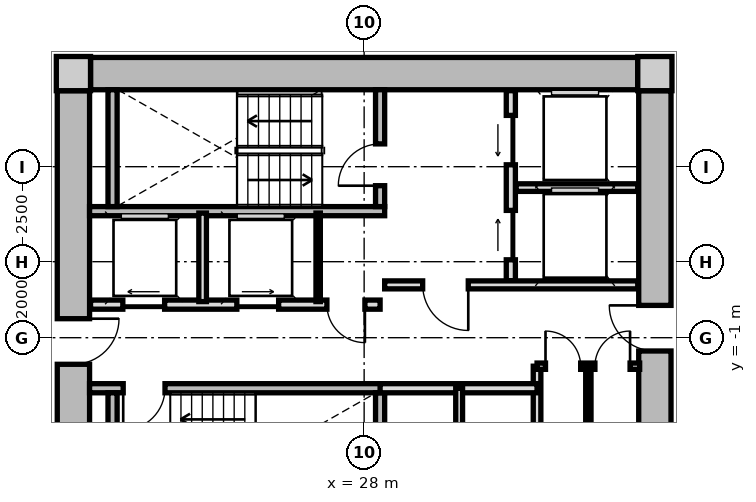
"""IFC4 building model, lengths in metres.
Left out: names, types, materials, properties, quantities, classifications, styles, units other than length and angle.
Written with IfcOpenShell. Run it as: python <this file> out.ifc"""

import sys

from ifc_helpers import new_model, si_unit, direction, frame, frame_2d, origin, origin_2d, place, context, subcontext, project, spatial, rectangle, extrude, source, transform, mapped, element, fill, save


model = new_model("IFC4")
c1 = context("Model", 3, precision=1e-05, world=origin(), true_north=direction((0.0, 1.0)))
c2 = subcontext(c1, "Body", "Model", "MODEL_VIEW")
j1 = project(units=[si_unit("LENGTHUNIT", "METRE"), si_unit("PLANEANGLEUNIT", "RADIAN")], contexts=[c1])
p1 = place(None, origin())
s1 = spatial("IfcSite", under=j1, at=p1, CompositionType="ELEMENT")
p2 = place(p1, origin())
s2 = spatial("IfcBuilding", under=s1, at=p2, CompositionType="ELEMENT")
p3 = place(p2, frame((0.0, 0.0, 70.4)))
s3 = spatial("IfcBuildingStorey", under=s2, at=p3, CompositionType="ELEMENT", Elevation=70.4)
m1 = source(origin(), c2, "Body", "SweptSolid", [
    extrude(rectangle(XDim=0.9, YDim=0.9, at=origin_2d()), origin(), (0.0, 0.0, 1.0), 3.05),
])
for number, where, z_axis, x_axis in (
    (1, (35.65, 5.95, 0.0), (0.0, 0.0, 1.0), (1.0, 0.0, 0.0)),
    (2, (20.35, 5.95, 0.0), (0.0, 0.0, 1.0), (1.0, 0.0, 0.0)),
):
    element("IfcColumn", number, at=place(p3, frame(where, z_axis=z_axis, x_axis=x_axis)), inside=s3, PredefinedType="COLUMN", context=c2, shape_type="MappedRepresentation", body=[
        mapped(m1, transform((0.0, 0.0, 0.0), x_axis=(1.0, 0.0, 0.0), y_axis=(0.0, 1.0, 0.0), z_axis=(0.0, 0.0, 1.0), scale=1.0)),
    ])
m2 = source(origin(), c2, "Body", "SweptSolid", [
    extrude(rectangle(XDim=14.4, YDim=0.85, at=frame_2d((7.2, 0.0))), origin(), (0.0, 0.0, 1.0), 2.73),
])
p4 = place(p3, frame((20.8, 5.95, 0.0), z_axis=(0.0, 0.0, 1.0), x_axis=(1.0, 0.0, 0.0)))
e3 = element("IfcWall", 3, at=p4, inside=s3, PredefinedType="SHEAR", context=c2, shape_type="MappedRepresentation", body=[
    mapped(m2, transform((0.0, 0.0, 0.0), x_axis=(1.0, 0.0, 0.0), y_axis=(0.0, 1.0, 0.0), z_axis=(0.0, 0.0, 1.0), scale=1.0)),
])
m3 = source(origin(), c2, "Body", "SweptSolid", [
    extrude(rectangle(XDim=11.0, YDim=0.85, at=frame_2d((5.5, 0.0))), origin(), (0.0, 0.0, 1.0), 2.73),
])
p5 = place(p3, frame((20.35, -5.5, 0.0), z_axis=(0.0, 0.0, 1.0), x_axis=(0.0, 1.0, 0.0)))
e4 = element("IfcWall", 4, at=p5, inside=s3, PredefinedType="SHEAR", context=c2, shape_type="MappedRepresentation", body=[
    mapped(m3, transform((0.0, 0.0, 0.0), x_axis=(1.0, 0.0, 0.0), y_axis=(0.0, 1.0, 0.0), z_axis=(0.0, 0.0, 1.0), scale=1.0)),
])
p6 = place(p5, frame((3.8, 0.0, 0.0)))
e5 = element("IfcOpeningElement", 5, at=p6, cuts=e4, PredefinedType="OPENING", context=c2, shape_type="SweptSolid", body=[
    extrude(rectangle(XDim=1.2, YDim=2.15, at=frame_2d((0.6, 1.075))), frame((0.0, 0.435, 0.0), z_axis=(0.0, -1.0, 0.0), x_axis=(1.0, 0.0, 0.0)), (0.0, 0.0, 1.0), 0.87),
])
p7 = place(p3, frame((35.65, 5.5, 0.0), z_axis=(0.0, 0.0, 1.0), x_axis=(0.0, -1.0, 0.0)))
e6 = element("IfcWall", 6, at=p7, inside=s3, PredefinedType="SHEAR", context=c2, shape_type="MappedRepresentation", body=[
    mapped(m3, transform((0.0, 0.0, 0.0), x_axis=(1.0, 0.0, 0.0), y_axis=(0.0, 1.0, 0.0), z_axis=(0.0, 0.0, 1.0), scale=1.0)),
])
p8 = place(p7, frame((5.65, 0.0, 0.0)))
e7 = element("IfcOpeningElement", 7, at=p8, cuts=e6, PredefinedType="OPENING", context=c2, shape_type="SweptSolid", body=[
    extrude(rectangle(XDim=1.2, YDim=2.15, at=frame_2d((0.6, 1.075))), frame((0.0, 0.435, 0.0), z_axis=(0.0, -1.0, 0.0), x_axis=(1.0, 0.0, 0.0)), (0.0, 0.0, 1.0), 0.87),
])
m4 = source(origin(), c2, "Body", "SweptSolid", [
    extrude(rectangle(XDim=7.765, YDim=0.24, at=frame_2d((3.883, 0.0))), origin(), (0.0, 0.0, 1.0), 2.73),
])
p9 = place(p3, frame((20.775, 2.33, 0.0), z_axis=(0.0, 0.0, 1.0), x_axis=(1.0, 0.0, 0.0)))
e8 = element("IfcWall", 8, at=p9, inside=s3, PredefinedType="PARTITIONING", context=c2, shape_type="MappedRepresentation", body=[
    mapped(m4, transform((0.0, 0.0, 0.0), x_axis=(1.0, 0.0, 0.0), y_axis=(0.0, 1.0, 0.0), z_axis=(0.0, 0.0, 1.0), scale=1.0)),
])
m5 = source(origin(), c2, "Body", "SweptSolid", [
    extrude(rectangle(XDim=3.075, YDim=0.24, at=frame_2d((1.538, 0.0))), origin(), (0.0, 0.0, 1.0), 2.73),
])
p10 = place(p3, frame((21.38, 2.45, 0.0), z_axis=(0.0, 0.0, 1.0), x_axis=(0.0, 1.0, 0.0)))
e9 = element("IfcWall", 9, at=p10, inside=s3, PredefinedType="PARTITIONING", context=c2, shape_type="MappedRepresentation", body=[
    mapped(m5, transform((0.0, 0.0, 0.0), x_axis=(1.0, 0.0, 0.0), y_axis=(0.0, 1.0, 0.0), z_axis=(0.0, 0.0, 1.0), scale=1.0)),
])
p11 = place(p3, frame((28.42, 2.45, 0.0), z_axis=(0.0, 0.0, 1.0), x_axis=(0.0, 1.0, 0.0)))
e10 = element("IfcWall", 10, at=p11, inside=s3, PredefinedType="PARTITIONING", context=c2, shape_type="MappedRepresentation", body=[
    mapped(m5, transform((0.0, 0.0, 0.0), x_axis=(1.0, 0.0, 0.0), y_axis=(0.0, 1.0, 0.0), z_axis=(0.0, 0.0, 1.0), scale=1.0)),
])
p12 = place(p11, frame((0.55, 0.0, 0.0)))
e11 = element("IfcOpeningElement", 11, at=p12, cuts=e10, PredefinedType="OPENING", context=c2, shape_type="SweptSolid", body=[
    extrude(rectangle(XDim=1.1, YDim=2.15, at=frame_2d((0.55, 1.075))), frame((0.0, 0.13, 0.0), z_axis=(0.0, -1.0, 0.0), x_axis=(1.0, 0.0, 0.0)), (0.0, 0.0, 1.0), 0.26),
])
p13 = place(p3, frame((20.775, -2.33, 0.0), z_axis=(0.0, 0.0, 1.0), x_axis=(1.0, 0.0, 0.0)))
e12 = element("IfcWall", 12, at=p13, inside=s3, PredefinedType="PARTITIONING", context=c2, shape_type="MappedRepresentation", body=[
    mapped(m4, transform((0.0, 0.0, 0.0), x_axis=(1.0, 0.0, 0.0), y_axis=(0.0, 1.0, 0.0), z_axis=(0.0, 0.0, 1.0), scale=1.0)),
])
p14 = place(p13, frame((0.885, 0.0, 0.0)))
e13 = element("IfcOpeningElement", 13, at=p14, cuts=e12, PredefinedType="OPENING", context=c2, shape_type="SweptSolid", body=[
    extrude(rectangle(XDim=1.1, YDim=2.15, at=frame_2d((0.55, 1.075))), frame((0.0, 0.13, 0.0), z_axis=(0.0, -1.0, 0.0), x_axis=(1.0, 0.0, 0.0)), (0.0, 0.0, 1.0), 0.26),
])
for number, where, z_axis, x_axis in (
    (14, (21.38, -5.525, 0.0), (0.0, 0.0, 1.0), (0.0, 1.0, 0.0)),
    (15, (28.42, -5.525, 0.0), (0.0, 0.0, 1.0), (0.0, 1.0, 0.0)),
):
    element("IfcWall", number, at=place(p3, frame(where, z_axis=z_axis, x_axis=x_axis)), inside=s3, PredefinedType="PARTITIONING", context=c2, shape_type="MappedRepresentation", body=[
        mapped(m5, transform((0.0, 0.0, 0.0), x_axis=(1.0, 0.0, 0.0), y_axis=(0.0, 1.0, 0.0), z_axis=(0.0, 0.0, 1.0), scale=1.0)),
    ])
m6 = source(origin(), c2, "Body", "SweptSolid", [
    extrude(rectangle(XDim=5.0, YDim=0.24, at=frame_2d((2.5, 0.0))), origin(), (0.0, 0.0, 1.0), 2.715),
])
p15 = place(p3, frame((31.86, 0.5, 0.0), z_axis=(0.0, 0.0, 1.0), x_axis=(0.0, 1.0, 0.0)))
e16 = element("IfcWall", 16, at=p15, inside=s3, PredefinedType="PARTITIONING", context=c2, shape_type="MappedRepresentation", body=[
    mapped(m6, transform((0.0, 0.0, 0.0), x_axis=(1.0, 0.0, 0.0), y_axis=(0.0, 1.0, 0.0), z_axis=(0.0, 0.0, 1.0), scale=1.0)),
])
p16 = place(p15, frame((3.05, 0.0, 0.0)))
e17 = element("IfcOpeningElement", 17, at=p16, cuts=e16, PredefinedType="OPENING", context=c2, shape_type="SweptSolid", body=[
    extrude(rectangle(XDim=1.3, YDim=2.2, at=frame_2d((0.65, 1.1))), frame((0.0, 0.13, 0.0), z_axis=(0.0, -1.0, 0.0), x_axis=(1.0, 0.0, 0.0)), (0.0, 0.0, 1.0), 0.26),
])
p17 = place(p15, frame((0.55, 0.0, 0.0)))
e18 = element("IfcOpeningElement", 18, at=p17, cuts=e16, PredefinedType="OPENING", context=c2, shape_type="SweptSolid", body=[
    extrude(rectangle(XDim=1.3, YDim=2.2, at=frame_2d((0.65, 1.1))), frame((0.0, 0.13, 0.0), z_axis=(0.0, -1.0, 0.0), x_axis=(1.0, 0.0, 0.0)), (0.0, 0.0, 1.0), 0.26),
])
m7 = source(origin(), c2, "Body", "SweptSolid", [
    extrude(rectangle(XDim=3.2, YDim=0.2, at=frame_2d((1.6, 0.0))), origin(), (0.0, 0.0, 1.0), 2.715),
])
p18 = place(p3, frame((32.0, 2.95, 0.0), z_axis=(0.0, 0.0, 1.0), x_axis=(1.0, 0.0, 0.0)))
e19 = element("IfcWall", 19, at=p18, inside=s3, PredefinedType="PARTITIONING", context=c2, shape_type="MappedRepresentation", body=[
    mapped(m7, transform((0.0, 0.0, 0.0), x_axis=(1.0, 0.0, 0.0), y_axis=(0.0, 1.0, 0.0), z_axis=(0.0, 0.0, 1.0), scale=1.0)),
])
m8 = source(origin(), c2, "Body", "SweptSolid", [
    extrude(rectangle(XDim=6.66, YDim=0.21, at=frame_2d((3.33, 0.0))), origin(), (0.0, 0.0, 1.0), 2.715),
])
p19 = place(p3, frame((28.54, 0.39, 0.0), z_axis=(0.0, 0.0, 1.0), x_axis=(1.0, 0.0, 0.0)))
e20 = element("IfcWall", 20, at=p19, inside=s3, PredefinedType="PARTITIONING", context=c2, shape_type="MappedRepresentation", body=[
    mapped(m8, transform((0.0, 0.0, 0.0), x_axis=(1.0, 0.0, 0.0), y_axis=(0.0, 1.0, 0.0), z_axis=(0.0, 0.0, 1.0), scale=1.0)),
])
p20 = place(p19, frame((1.0, 0.0, 0.0)))
e21 = element("IfcOpeningElement", 21, at=p20, cuts=e20, PredefinedType="OPENING", context=c2, shape_type="SweptSolid", body=[
    extrude(rectangle(XDim=1.2, YDim=2.15, at=frame_2d((0.6, 1.075))), frame((0.0, 0.115, 0.0), z_axis=(0.0, -1.0, 0.0), x_axis=(1.0, 0.0, 0.0)), (0.0, 0.0, 1.0), 0.23),
])
m9 = source(origin(), c2, "Body", "SweptSolid", [
    extrude(rectangle(XDim=7.62, YDim=0.24, at=frame_2d((3.81, 0.0))), origin(), (0.0, 0.0, 1.0), 2.715),
])
p21 = place(p3, frame((20.8, -0.13, 0.0), z_axis=(0.0, 0.0, 1.0), x_axis=(1.0, 0.0, 0.0)))
e22 = element("IfcWall", 22, at=p21, inside=s3, PredefinedType="PARTITIONING", context=c2, shape_type="MappedRepresentation", body=[
    mapped(m9, transform((0.0, 0.0, 0.0), x_axis=(1.0, 0.0, 0.0), y_axis=(0.0, 1.0, 0.0), z_axis=(0.0, 0.0, 1.0), scale=1.0)),
])
p22 = place(p21, frame((6.22, 0.0, 0.0)))
e23 = element("IfcOpeningElement", 23, at=p22, cuts=e22, PredefinedType="OPENING", context=c2, shape_type="SweptSolid", body=[
    extrude(rectangle(XDim=1.0, YDim=2.1, at=frame_2d((0.5, 1.05))), frame((0.0, 0.13, 0.0), z_axis=(0.0, -1.0, 0.0), x_axis=(1.0, 0.0, 0.0)), (0.0, 0.0, 1.0), 0.26),
])
p23 = place(p21, frame((0.85, 0.0, 0.0)))
e24 = element("IfcOpeningElement", 24, at=p23, cuts=e22, PredefinedType="OPENING", context=c2, shape_type="SweptSolid", body=[
    extrude(rectangle(XDim=1.1, YDim=2.2, at=frame_2d((0.55, 1.1))), frame((0.0, 0.13, 0.0), z_axis=(0.0, -1.0, 0.0), x_axis=(1.0, 0.0, 0.0)), (0.0, 0.0, 1.0), 0.26),
])
p24 = place(p21, frame((3.85, 0.0, 0.0)))
e25 = element("IfcOpeningElement", 25, at=p24, cuts=e22, PredefinedType="OPENING", context=c2, shape_type="SweptSolid", body=[
    extrude(rectangle(XDim=1.1, YDim=2.2, at=frame_2d((0.55, 1.1))), frame((0.0, 0.13, 0.0), z_axis=(0.0, -1.0, 0.0), x_axis=(1.0, 0.0, 0.0)), (0.0, 0.0, 1.0), 0.26),
])
m10 = source(origin(), c2, "Body", "SweptSolid", [
    extrude(rectangle(XDim=2.33, YDim=0.115, at=frame_2d((1.165, 0.0))), origin(), (0.0, 0.0, 1.0), 2.715),
])
p25 = place(p3, frame((26.79, -0.05, 0.0), z_axis=(0.0, 0.0, 1.0), x_axis=(0.0, 1.0, 0.0)))
e26 = element("IfcWall", 26, at=p25, inside=s3, PredefinedType="PARTITIONING", context=c2, shape_type="MappedRepresentation", body=[
    mapped(m10, transform((0.0, 0.0, 0.0), x_axis=(1.0, 0.0, 0.0), y_axis=(0.0, 1.0, 0.0), z_axis=(0.0, 0.0, 1.0), scale=1.0)),
])
m11 = source(origin(), c2, "Body", "SweptSolid", [
    extrude(rectangle(XDim=2.33, YDim=0.2, at=frame_2d((1.165, 0.0))), origin(), (0.0, 0.0, 1.0), 2.715),
])
p26 = place(p3, frame((23.75, -0.05, 0.0), z_axis=(0.0, 0.0, 1.0), x_axis=(0.0, 1.0, 0.0)))
e27 = element("IfcWall", 27, at=p26, inside=s3, PredefinedType="PARTITIONING", context=c2, shape_type="MappedRepresentation", body=[
    mapped(m11, transform((0.0, 0.0, 0.0), x_axis=(1.0, 0.0, 0.0), y_axis=(0.0, 1.0, 0.0), z_axis=(0.0, 0.0, 1.0), scale=1.0)),
])
m12 = source(origin(), c2, "Body", "SweptSolid", [
    extrude(rectangle(XDim=3.8, YDim=0.2, at=frame_2d((1.9, 0.0))), origin(), (0.0, 0.0, 1.0), 2.715),
])
p27 = place(p3, frame((32.55, -5.55, 0.0), z_axis=(0.0, 0.0, 1.0), x_axis=(0.0, 1.0, 0.0)))
e28 = element("IfcWall", 28, at=p27, inside=s3, PredefinedType="PARTITIONING", context=c2, shape_type="MappedRepresentation", body=[
    mapped(m12, transform((0.0, 0.0, 0.0), x_axis=(1.0, 0.0, 0.0), y_axis=(0.0, 1.0, 0.0), z_axis=(0.0, 0.0, 1.0), scale=1.0)),
])
m13 = source(origin(), c2, "Body", "SweptSolid", [
    extrude(rectangle(XDim=4.13, YDim=0.24, at=frame_2d((2.065, 0.0))), origin(), (0.0, 0.0, 1.0), 2.715),
])
p28 = place(p3, frame((28.42, -2.33, 0.0), z_axis=(0.0, 0.0, 1.0), x_axis=(1.0, 0.0, 0.0)))
e29 = element("IfcWall", 29, at=p28, inside=s3, PredefinedType="PARTITIONING", context=c2, shape_type="MappedRepresentation", body=[
    mapped(m13, transform((0.0, 0.0, 0.0), x_axis=(1.0, 0.0, 0.0), y_axis=(0.0, 1.0, 0.0), z_axis=(0.0, 0.0, 1.0), scale=1.0)),
])
m14 = source(origin(), c2, "Body", "SweptSolid", [
    extrude(rectangle(XDim=3.22, YDim=0.18, at=frame_2d((1.61, 0.0))), origin(), (0.0, 0.0, 1.0), 2.715),
])
p29 = place(p3, frame((30.5, -5.55, 0.0), z_axis=(0.0, 0.0, 1.0), x_axis=(0.0, 1.0, 0.0)))
e30 = element("IfcWall", 30, at=p29, inside=s3, PredefinedType="PARTITIONING", context=c2, shape_type="MappedRepresentation", body=[
    mapped(m14, transform((0.0, 0.0, 0.0), x_axis=(1.0, 0.0, 0.0), y_axis=(0.0, 1.0, 0.0), z_axis=(0.0, 0.0, 1.0), scale=1.0)),
])
m15 = source(origin(), c2, "Body", "SweptSolid", [
    extrude(rectangle(XDim=2.7, YDim=0.165, at=frame_2d((1.35, 0.0))), origin(), (0.0, 0.0, 1.0), 2.715),
])
p30 = place(p3, frame((32.55, -1.75, 0.0), z_axis=(0.0, 0.0, 1.0), x_axis=(1.0, 0.0, 0.0)))
e31 = element("IfcWall", 31, at=p30, inside=s3, PredefinedType="PARTITIONING", context=c2, shape_type="MappedRepresentation", body=[
    mapped(m15, transform((0.0, 0.0, 0.0), x_axis=(1.0, 0.0, 0.0), y_axis=(0.0, 1.0, 0.0), z_axis=(0.0, 0.0, 1.0), scale=1.0)),
])
p31 = place(p30, frame((0.222, 0.0, 0.0)))
e32 = element("IfcOpeningElement", 32, at=p31, cuts=e31, PredefinedType="OPENING", context=c2, shape_type="SweptSolid", body=[
    extrude(rectangle(XDim=0.925, YDim=2.1, at=frame_2d((0.462, 1.05))), frame((0.0, 0.093, 0.0), z_axis=(0.0, -1.0, 0.0), x_axis=(1.0, 0.0, 0.0)), (0.0, 0.0, 1.0), 0.185),
])
p32 = place(p30, frame((1.522, 0.0, 0.0)))
e33 = element("IfcOpeningElement", 33, at=p32, cuts=e31, PredefinedType="OPENING", context=c2, shape_type="SweptSolid", body=[
    extrude(rectangle(XDim=0.925, YDim=2.1, at=frame_2d((0.462, 1.05))), frame((0.0, 0.093, 0.0), z_axis=(0.0, -1.0, 0.0), x_axis=(1.0, 0.0, 0.0)), (0.0, 0.0, 1.0), 0.185),
])
m16 = source(origin(), c2, "Body", "SweptSolid", [
    extrude(rectangle(XDim=3.8, YDim=0.14, at=frame_2d((1.9, 0.0))), origin(), (0.0, 0.0, 1.0), 2.715),
])
p33 = place(p3, frame((33.9, -5.55, 0.0), z_axis=(0.0, 0.0, 1.0), x_axis=(0.0, 1.0, 0.0)))
e34 = element("IfcWall", 34, at=p33, inside=s3, PredefinedType="PARTITIONING", context=c2, shape_type="MappedRepresentation", body=[
    mapped(m16, transform((0.0, 0.0, 0.0), x_axis=(1.0, 0.0, 0.0), y_axis=(0.0, 1.0, 0.0), z_axis=(0.0, 0.0, 1.0), scale=1.0)),
])
m17 = source(origin(), c2, "Body", "SweptSolid", [
    extrude(rectangle(XDim=1.1, YDim=2.15, at=frame_2d((0.55, 1.075))), frame((0.0, 0.025, 0.0), z_axis=(0.0, -1.0, 0.0), x_axis=(1.0, 0.0, 0.0)), (0.0, 0.0, 1.0), 0.05),
])
p34 = place(p12, origin())
e35 = element("IfcDoor", 35, at=p34, inside=s3, OperationType="SINGLE_SWING_LEFT", PredefinedType="DOOR", context=c2, shape_type="MappedRepresentation", body=[
    mapped(m17, transform((0.0, 0.0, 0.0), x_axis=(1.0, 0.0, 0.0), y_axis=(0.0, 1.0, 0.0), z_axis=(0.0, 0.0, 1.0), scale=1.0)),
])
fill(e11, e35)
p35 = place(p14, frame((1.1, 0.0, 0.0), z_axis=(0.0, 0.0, 1.0), x_axis=(-1.0, 0.0, 0.0)))
e36 = element("IfcDoor", 36, at=p35, inside=s3, OperationType="SINGLE_SWING_RIGHT", PredefinedType="DOOR", context=c2, shape_type="MappedRepresentation", body=[
    mapped(m17, transform((0.0, 0.0, 0.0), x_axis=(1.0, 0.0, 0.0), y_axis=(0.0, 1.0, 0.0), z_axis=(0.0, 0.0, 1.0), scale=1.0)),
])
fill(e13, e36)
m18 = source(origin(), c2, "Body", "SweptSolid", [
    extrude(rectangle(XDim=1.3, YDim=2.2, at=frame_2d((0.65, 1.1))), frame((0.0, 0.025, 0.0), z_axis=(0.0, -1.0, 0.0), x_axis=(1.0, 0.0, 0.0)), (0.0, 0.0, 1.0), 0.05),
])
p36 = place(p16, origin())
e37 = element("IfcDoor", 37, at=p36, inside=s3, OperationType="SLIDING_TO_LEFT", PredefinedType="DOOR", context=c2, shape_type="MappedRepresentation", body=[
    mapped(m18, transform((0.0, 0.0, 0.0), x_axis=(1.0, 0.0, 0.0), y_axis=(0.0, 1.0, 0.0), z_axis=(0.0, 0.0, 1.0), scale=1.0)),
])
fill(e17, e37)
p37 = place(p17, origin())
e38 = element("IfcDoor", 38, at=p37, inside=s3, OperationType="SLIDING_TO_RIGHT", PredefinedType="DOOR", context=c2, shape_type="MappedRepresentation", body=[
    mapped(m18, transform((0.0, 0.0, 0.0), x_axis=(1.0, 0.0, 0.0), y_axis=(0.0, 1.0, 0.0), z_axis=(0.0, 0.0, 1.0), scale=1.0)),
])
fill(e18, e38)
m19 = source(origin(), c2, "Body", "SweptSolid", [
    extrude(rectangle(XDim=1.2, YDim=2.15, at=frame_2d((0.6, 1.075))), frame((0.0, 0.025, 0.0), z_axis=(0.0, -1.0, 0.0), x_axis=(1.0, 0.0, 0.0)), (0.0, 0.0, 1.0), 0.05),
])
p38 = place(p20, frame((1.2, 0.0, 0.0), z_axis=(0.0, 0.0, 1.0), x_axis=(-1.0, 0.0, 0.0)))
e39 = element("IfcDoor", 39, at=p38, inside=s3, OperationType="SINGLE_SWING_LEFT", PredefinedType="DOOR", context=c2, shape_type="MappedRepresentation", body=[
    mapped(m19, transform((0.0, 0.0, 0.0), x_axis=(1.0, 0.0, 0.0), y_axis=(0.0, 1.0, 0.0), z_axis=(0.0, 0.0, 1.0), scale=1.0)),
])
fill(e21, e39)
p39 = place(p6, frame((1.2, 0.0, 0.0), z_axis=(0.0, 0.0, 1.0), x_axis=(-1.0, 0.0, 0.0)))
e40 = element("IfcDoor", 40, at=p39, inside=s3, OperationType="SINGLE_SWING_LEFT", PredefinedType="DOOR", context=c2, shape_type="MappedRepresentation", body=[
    mapped(m19, transform((0.0, 0.0, 0.0), x_axis=(1.0, 0.0, 0.0), y_axis=(0.0, 1.0, 0.0), z_axis=(0.0, 0.0, 1.0), scale=1.0)),
])
fill(e5, e40)
p40 = place(p8, frame((1.2, 0.0, 0.0), z_axis=(0.0, 0.0, 1.0), x_axis=(-1.0, 0.0, 0.0)))
e41 = element("IfcDoor", 41, at=p40, inside=s3, OperationType="SINGLE_SWING_RIGHT", PredefinedType="DOOR", context=c2, shape_type="MappedRepresentation", body=[
    mapped(m19, transform((0.0, 0.0, 0.0), x_axis=(1.0, 0.0, 0.0), y_axis=(0.0, 1.0, 0.0), z_axis=(0.0, 0.0, 1.0), scale=1.0)),
])
fill(e7, e41)
m20 = source(origin(), c2, "Body", "SweptSolid", [
    extrude(rectangle(XDim=1.0, YDim=2.1, at=frame_2d((0.5, 1.05))), frame((0.0, 0.025, 0.0), z_axis=(0.0, -1.0, 0.0), x_axis=(1.0, 0.0, 0.0)), (0.0, 0.0, 1.0), 0.05),
])
p41 = place(p22, frame((1.0, 0.0, 0.0), z_axis=(0.0, 0.0, 1.0), x_axis=(-1.0, 0.0, 0.0)))
e42 = element("IfcDoor", 42, at=p41, inside=s3, OperationType="SINGLE_SWING_LEFT", PredefinedType="DOOR", context=c2, shape_type="MappedRepresentation", body=[
    mapped(m20, transform((0.0, 0.0, 0.0), x_axis=(1.0, 0.0, 0.0), y_axis=(0.0, 1.0, 0.0), z_axis=(0.0, 0.0, 1.0), scale=1.0)),
])
fill(e23, e42)
m21 = source(origin(), c2, "Body", "SweptSolid", [
    extrude(rectangle(XDim=1.1, YDim=2.2, at=frame_2d((0.55, 1.1))), frame((0.0, 0.025, 0.0), z_axis=(0.0, -1.0, 0.0), x_axis=(1.0, 0.0, 0.0)), (0.0, 0.0, 1.0), 0.05),
])
p42 = place(p23, origin())
e43 = element("IfcDoor", 43, at=p42, inside=s3, OperationType="SLIDING_TO_LEFT", PredefinedType="DOOR", context=c2, shape_type="MappedRepresentation", body=[
    mapped(m21, transform((0.0, 0.0, 0.0), x_axis=(1.0, 0.0, 0.0), y_axis=(0.0, 1.0, 0.0), z_axis=(0.0, 0.0, 1.0), scale=1.0)),
])
fill(e24, e43)
p43 = place(p24, origin())
e44 = element("IfcDoor", 44, at=p43, inside=s3, OperationType="SLIDING_TO_RIGHT", PredefinedType="DOOR", context=c2, shape_type="MappedRepresentation", body=[
    mapped(m21, transform((0.0, 0.0, 0.0), x_axis=(1.0, 0.0, 0.0), y_axis=(0.0, 1.0, 0.0), z_axis=(0.0, 0.0, 1.0), scale=1.0)),
])
fill(e25, e44)
m22 = source(origin(), c2, "Body", "SweptSolid", [
    extrude(rectangle(XDim=0.925, YDim=2.1, at=frame_2d((0.462, 1.05))), frame((0.0, 0.025, 0.0), z_axis=(0.0, -1.0, 0.0), x_axis=(1.0, 0.0, 0.0)), (0.0, 0.0, 1.0), 0.05),
])
p44 = place(p31, origin())
e45 = element("IfcDoor", 45, at=p44, inside=s3, OperationType="SINGLE_SWING_LEFT", PredefinedType="DOOR", context=c2, shape_type="MappedRepresentation", body=[
    mapped(m22, transform((0.0, 0.0, 0.0), x_axis=(1.0, 0.0, 0.0), y_axis=(0.0, 1.0, 0.0), z_axis=(0.0, 0.0, 1.0), scale=1.0)),
])
fill(e32, e45)
p45 = place(p32, origin())
e46 = element("IfcDoor", 46, at=p45, inside=s3, OperationType="SINGLE_SWING_RIGHT", PredefinedType="DOOR", context=c2, shape_type="MappedRepresentation", body=[
    mapped(m22, transform((0.0, 0.0, 0.0), x_axis=(1.0, 0.0, 0.0), y_axis=(0.0, 1.0, 0.0), z_axis=(0.0, 0.0, 1.0), scale=1.0)),
])
fill(e33, e46)
save(model, sys.argv[1])
